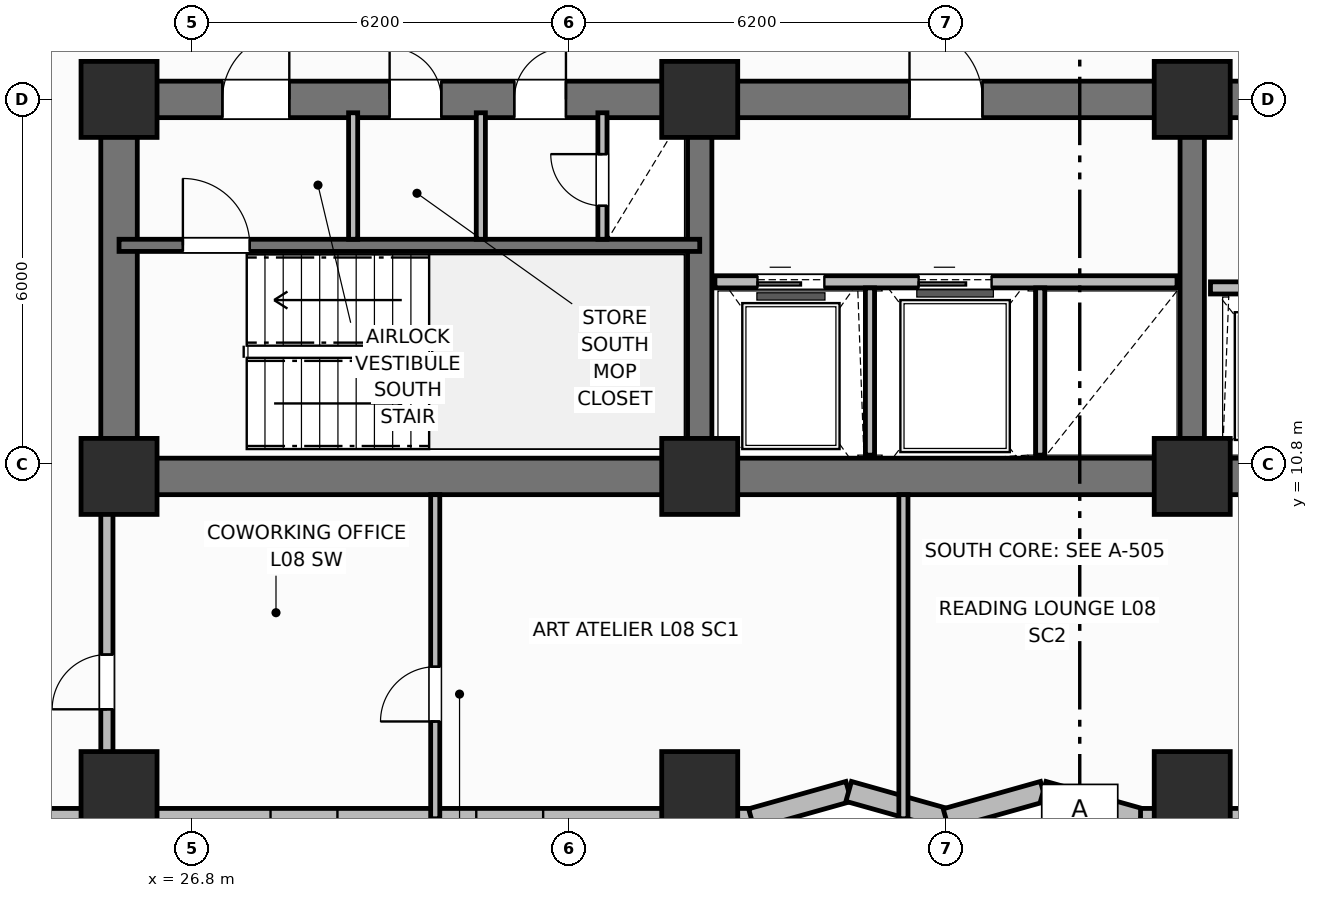
"""IFC4 building model, lengths in metres.
Left out: names, types, materials, properties, quantities, classifications, styles, units other than length and angle.
Written with IfcOpenShell. Run it as: python <this file> out.ifc"""

import sys

from ifc_helpers import new_model, si_unit, direction, frame, frame_2d, origin, origin_2d, place, context, subcontext, project, spatial, rectangle, extrude, element, fill, save


model = new_model("IFC4")
c1 = context("Model", 3, precision=1e-05, world=origin(), true_north=direction((0.0, 1.0)))
c2 = subcontext(c1, "Body", "Model", "MODEL_VIEW")
j1 = project(units=[si_unit("LENGTHUNIT", "METRE"), si_unit("PLANEANGLEUNIT", "RADIAN")], contexts=[c1])
p1 = place(None, origin())
s1 = spatial("IfcSite", under=j1, at=p1, CompositionType="ELEMENT")
p2 = place(p1, origin())
s2 = spatial("IfcBuilding", under=s1, at=p2, CompositionType="ELEMENT")
p3 = place(p2, frame((0.0, 0.0, 36.2)))
s3 = spatial("IfcBuildingStorey", under=s2, at=p3, CompositionType="ELEMENT", Elevation=36.2)
p4 = place(p3, frame((52.8, 10.6, 0.0), z_axis=(0.0, 0.0, 1.0), x_axis=(-1.0, 0.0, 0.0)))
e1 = element("IfcWall", 1, at=p4, inside=s3, PredefinedType="SHEAR", context=c2, shape_type="SweptSolid", body=[
    extrude(rectangle(XDim=27.2, YDim=0.6, at=frame_2d((13.6, 0.0))), origin(), (0.0, 0.0, 1.0), 3.7),
])
p5 = place(p3, frame((25.6, 10.9, 0.0), z_axis=(0.0, 0.0, 1.0), x_axis=(0.0, 1.0, 0.0)))
e2 = element("IfcWall", 2, at=p5, inside=s3, PredefinedType="SHEAR", context=c2, shape_type="SweptSolid", body=[
    extrude(rectangle(XDim=5.6, YDim=0.6, at=frame_2d((2.8, 0.0))), origin(), (0.0, 0.0, 1.0), 3.7),
])
p6 = place(p3, frame((25.6, 16.8, 0.0), z_axis=(0.0, 0.0, 1.0), x_axis=(1.0, 0.0, 0.0)))
e3 = element("IfcWall", 3, at=p6, inside=s3, PredefinedType="SHEAR", context=c2, shape_type="SweptSolid", body=[
    extrude(rectangle(XDim=27.2, YDim=0.6, at=frame_2d((13.6, 0.0))), origin(), (0.0, 0.0, 1.0), 3.7),
])
p7 = place(p6, frame((1.7, 0.0, 0.0)))
e4 = element("IfcOpeningElement", 4, at=p7, cuts=e3, PredefinedType="OPENING", context=c2, shape_type="SweptSolid", body=[
    extrude(rectangle(XDim=1.1, YDim=2.15, at=frame_2d((0.55, 1.075))), frame((0.0, 0.31, 0.0), z_axis=(0.0, -1.0, 0.0), x_axis=(1.0, 0.0, 0.0)), (0.0, 0.0, 1.0), 0.62),
])
p8 = place(p6, frame((4.45, 0.0, 0.0)))
e5 = element("IfcOpeningElement", 5, at=p8, cuts=e3, PredefinedType="OPENING", context=c2, shape_type="SweptSolid", body=[
    extrude(rectangle(XDim=0.85, YDim=2.1, at=frame_2d((0.425, 1.05))), frame((0.0, 0.31, 0.0), z_axis=(0.0, -1.0, 0.0), x_axis=(1.0, 0.0, 0.0)), (0.0, 0.0, 1.0), 0.62),
])
p9 = place(p6, frame((6.5, 0.0, 0.0)))
e6 = element("IfcOpeningElement", 6, at=p9, cuts=e3, PredefinedType="OPENING", context=c2, shape_type="SweptSolid", body=[
    extrude(rectangle(XDim=0.85, YDim=2.1, at=frame_2d((0.425, 1.05))), frame((0.0, 0.31, 0.0), z_axis=(0.0, -1.0, 0.0), x_axis=(1.0, 0.0, 0.0)), (0.0, 0.0, 1.0), 0.62),
])
p10 = place(p6, frame((13.0, 0.0, 0.0)))
e7 = element("IfcOpeningElement", 7, at=p10, cuts=e3, PredefinedType="OPENING", context=c2, shape_type="SweptSolid", body=[
    extrude(rectangle(XDim=1.2, YDim=2.15, at=frame_2d((0.6, 1.075))), frame((0.0, 0.31, 0.0), z_axis=(0.0, -1.0, 0.0), x_axis=(1.0, 0.0, 0.0)), (0.0, 0.0, 1.0), 0.62),
])
p11 = place(p6, frame((20.4, 0.0, 0.0)))
e8 = element("IfcOpeningElement", 8, at=p11, cuts=e3, PredefinedType="OPENING", context=c2, shape_type="SweptSolid", body=[
    extrude(rectangle(XDim=1.3, YDim=2.2, at=frame_2d((0.65, 1.1))), frame((0.0, 0.31, 0.0), z_axis=(0.0, -1.0, 0.0), x_axis=(1.0, 0.0, 0.0)), (0.0, 0.0, 1.0), 0.62),
])
p12 = place(p6, frame((24.65, 0.0, 0.0)))
e9 = element("IfcOpeningElement", 9, at=p12, cuts=e3, PredefinedType="OPENING", context=c2, shape_type="SweptSolid", body=[
    extrude(rectangle(XDim=0.85, YDim=2.1, at=frame_2d((0.425, 1.05))), frame((0.0, 0.31, 0.0), z_axis=(0.0, -1.0, 0.0), x_axis=(1.0, 0.0, 0.0)), (0.0, 0.0, 1.0), 0.62),
])
for number, where, z_axis, x_axis in (
    (10, (35.15, 10.9, 0.0), (0.0, 0.0, 1.0), (0.0, 1.0, 0.0)),
    (11, (43.25, 10.9, 0.0), (0.0, 0.0, 1.0), (0.0, 1.0, 0.0)),
):
    element("IfcWall", number, at=place(p3, frame(where, z_axis=z_axis, x_axis=x_axis)), inside=s3, PredefinedType="SHEAR", context=c2, shape_type="SweptSolid", body=[
        extrude(rectangle(XDim=5.6, YDim=0.4, at=frame_2d((2.8, 0.0))), origin(), (0.0, 0.0, 1.0), 3.7),
    ])
for number, where, z_axis, x_axis in (
    (12, (25.6, 10.6, 0.0), (0.0, 0.0, 1.0), (1.0, 0.0, 0.0)),
    (13, (25.6, 16.8, 0.0), (0.0, 0.0, 1.0), (1.0, 0.0, 0.0)),
    (14, (35.15, 10.6, 0.0), (0.0, 0.0, 1.0), (1.0, 0.0, 0.0)),
    (15, (35.15, 16.8, 0.0), (0.0, 0.0, 1.0), (1.0, 0.0, 0.0)),
    (16, (43.25, 10.6, 0.0), (0.0, 0.0, 1.0), (1.0, 0.0, 0.0)),
    (17, (43.25, 16.8, 0.0), (0.0, 0.0, 1.0), (1.0, 0.0, 0.0)),
    (18, (25.6, 5.45, 0.0), (0.0, 0.0, 1.0), (1.0, 0.0, 0.0)),
    (19, (35.15, 5.45, 0.0), (0.0, 0.0, 1.0), (1.0, 0.0, 0.0)),
    (20, (43.25, 5.45, 0.0), (0.0, 0.0, 1.0), (1.0, 0.0, 0.0)),
):
    element("IfcColumn", number, at=place(p3, frame(where, z_axis=z_axis, x_axis=x_axis)), inside=s3, PredefinedType="COLUMN", context=c2, shape_type="SweptSolid", body=[
        extrude(rectangle(XDim=1.25, YDim=1.25, at=origin_2d()), origin(), (0.0, 0.0, 1.0), 3.7),
    ])
p13 = place(p3, frame((18.6, 4.97, 0.0), z_axis=(0.0, 0.0, 1.0), x_axis=(1.0, 0.0, 0.0)))
e21 = element("IfcWall", 21, at=p13, inside=s3, PredefinedType="SOLIDWALL", context=c2, shape_type="SweptSolid", body=[
    extrude(rectangle(XDim=17.4, YDim=0.34, at=frame_2d((8.7, 0.0))), origin(), (0.0, 0.0, 1.0), 2.7),
])
p14 = place(p13, frame((1.442, 0.0, 0.93)))
e22 = element("IfcOpeningElement", 22, at=p14, cuts=e21, PredefinedType="OPENING", context=c2, shape_type="SweptSolid", body=[
    extrude(rectangle(XDim=1.1, YDim=1.65, at=frame_2d((0.55, 0.825))), frame((0.0, 0.18, 0.0), z_axis=(0.0, -1.0, 0.0), x_axis=(1.0, 0.0, 0.0)), (0.0, 0.0, 1.0), 0.36),
])
p15 = place(p13, frame((3.075, 0.0, 0.93)))
e23 = element("IfcOpeningElement", 23, at=p15, cuts=e21, PredefinedType="OPENING", context=c2, shape_type="SweptSolid", body=[
    extrude(rectangle(XDim=1.1, YDim=1.65, at=frame_2d((0.55, 0.825))), frame((0.0, 0.18, 0.0), z_axis=(0.0, -1.0, 0.0), x_axis=(1.0, 0.0, 0.0)), (0.0, 0.0, 1.0), 0.36),
])
p16 = place(p13, frame((9.492, 0.0, 0.93)))
e24 = element("IfcOpeningElement", 24, at=p16, cuts=e21, PredefinedType="OPENING", context=c2, shape_type="SweptSolid", body=[
    extrude(rectangle(XDim=1.1, YDim=1.65, at=frame_2d((0.55, 0.825))), frame((0.0, 0.18, 0.0), z_axis=(0.0, -1.0, 0.0), x_axis=(1.0, 0.0, 0.0)), (0.0, 0.0, 1.0), 0.36),
])
p17 = place(p13, frame((12.875, 0.0, 0.93)))
e25 = element("IfcOpeningElement", 25, at=p17, cuts=e21, PredefinedType="OPENING", context=c2, shape_type="SweptSolid", body=[
    extrude(rectangle(XDim=1.1, YDim=1.65, at=frame_2d((0.55, 0.825))), frame((0.0, 0.18, 0.0), z_axis=(0.0, -1.0, 0.0), x_axis=(1.0, 0.0, 0.0)), (0.0, 0.0, 1.0), 0.36),
])
p18 = place(p3, frame((36.0, 4.97, 0.0), z_axis=(0.0, 0.0, 1.0), x_axis=(0.962662902433, 0.270703040766, 0.0)))
e26 = element("IfcWall", 26, at=p18, inside=s3, PredefinedType="SOLIDWALL", context=c2, shape_type="SweptSolid", body=[
    extrude(rectangle(XDim=1.662, YDim=0.34, at=frame_2d((0.831, 0.0))), origin(), (0.0, 0.0, 1.0), 2.7),
])
p19 = place(p3, frame((37.6, 5.42, 0.0), z_axis=(0.0, 0.0, 1.0), x_axis=(0.962652136636, -0.270741322725, 0.0)))
e27 = element("IfcWall", 27, at=p19, inside=s3, PredefinedType="SOLIDWALL", context=c2, shape_type="SweptSolid", body=[
    extrude(rectangle(XDim=1.662, YDim=0.34, at=frame_2d((0.831, 0.0))), origin(), (0.0, 0.0, 1.0), 2.7),
])
p20 = place(p3, frame((39.2, 4.97, 0.0), z_axis=(0.0, 0.0, 1.0), x_axis=(0.962662902433, 0.270703040766, 0.0)))
e28 = element("IfcWall", 28, at=p20, inside=s3, PredefinedType="SOLIDWALL", context=c2, shape_type="SweptSolid", body=[
    extrude(rectangle(XDim=1.662, YDim=0.34, at=frame_2d((0.831, 0.0))), origin(), (0.0, 0.0, 1.0), 2.7),
])
p21 = place(p3, frame((40.8, 5.42, 0.0), z_axis=(0.0, 0.0, 1.0), x_axis=(0.962652136636, -0.270741322725, 0.0)))
e29 = element("IfcWall", 29, at=p21, inside=s3, PredefinedType="SOLIDWALL", context=c2, shape_type="SweptSolid", body=[
    extrude(rectangle(XDim=1.662, YDim=0.34, at=frame_2d((0.831, 0.0))), origin(), (0.0, 0.0, 1.0), 2.7),
])
p22 = place(p3, frame((42.4, 4.97, 0.0), z_axis=(0.0, 0.0, 1.0), x_axis=(1.0, 0.0, 0.0)))
e30 = element("IfcWall", 30, at=p22, inside=s3, PredefinedType="SOLIDWALL", context=c2, shape_type="SweptSolid", body=[
    extrude(rectangle(XDim=17.4, YDim=0.34, at=frame_2d((8.7, 0.0))), origin(), (0.0, 0.0, 1.0), 2.7),
])
p23 = place(p22, frame((2.06, 0.0, 0.93)))
e31 = element("IfcOpeningElement", 31, at=p23, cuts=e30, PredefinedType="OPENING", context=c2, shape_type="SweptSolid", body=[
    extrude(rectangle(XDim=1.1, YDim=1.65, at=frame_2d((0.55, 0.825))), frame((0.0, 0.18, 0.0), z_axis=(0.0, -1.0, 0.0), x_axis=(1.0, 0.0, 0.0)), (0.0, 0.0, 1.0), 0.36),
])
p24 = place(p22, frame((5.28, 0.0, 0.93)))
e32 = element("IfcOpeningElement", 32, at=p24, cuts=e30, PredefinedType="OPENING", context=c2, shape_type="SweptSolid", body=[
    extrude(rectangle(XDim=1.1, YDim=1.65, at=frame_2d((0.55, 0.825))), frame((0.0, 0.18, 0.0), z_axis=(0.0, -1.0, 0.0), x_axis=(1.0, 0.0, 0.0)), (0.0, 0.0, 1.0), 0.36),
])
p25 = place(p22, frame((7.8, 0.0, 0.93)))
e33 = element("IfcOpeningElement", 33, at=p25, cuts=e30, PredefinedType="OPENING", context=c2, shape_type="SweptSolid", body=[
    extrude(rectangle(XDim=1.1, YDim=1.65, at=frame_2d((0.55, 0.825))), frame((0.0, 0.18, 0.0), z_axis=(0.0, -1.0, 0.0), x_axis=(1.0, 0.0, 0.0)), (0.0, 0.0, 1.0), 0.36),
])
p26 = place(p22, frame((14.59, 0.0, 0.93)))
e34 = element("IfcOpeningElement", 34, at=p26, cuts=e30, PredefinedType="OPENING", context=c2, shape_type="SweptSolid", body=[
    extrude(rectangle(XDim=1.1, YDim=1.65, at=frame_2d((0.55, 0.825))), frame((0.0, 0.18, 0.0), z_axis=(0.0, -1.0, 0.0), x_axis=(1.0, 0.0, 0.0)), (0.0, 0.0, 1.0), 0.36),
])
p27 = place(p3, frame((25.6, 14.4, 0.0), z_axis=(0.0, 0.0, 1.0), x_axis=(1.0, 0.0, 0.0)))
e35 = element("IfcWall", 35, at=p27, inside=s3, PredefinedType="SHEAR", context=c2, shape_type="SweptSolid", body=[
    extrude(rectangle(XDim=9.55, YDim=0.2, at=frame_2d((4.775, 0.0))), origin(), (0.0, 0.0, 1.0), 3.7),
])
p28 = place(p27, frame((1.05, 0.0, 0.0)))
e36 = element("IfcOpeningElement", 36, at=p28, cuts=e35, PredefinedType="OPENING", context=c2, shape_type="SweptSolid", body=[
    extrude(rectangle(XDim=1.1, YDim=2.15, at=frame_2d((0.55, 1.075))), frame((0.0, 0.11, 0.0), z_axis=(0.0, -1.0, 0.0), x_axis=(1.0, 0.0, 0.0)), (0.0, 0.0, 1.0), 0.22),
])
for number, where, z_axis, x_axis in (
    (37, (29.45, 14.5, 0.0), (0.0, 0.0, 1.0), (0.0, 1.0, 0.0)),
    (38, (31.55, 14.5, 0.0), (0.0, 0.0, 1.0), (0.0, 1.0, 0.0)),
):
    element("IfcWall", number, at=place(p3, frame(where, z_axis=z_axis, x_axis=x_axis)), inside=s3, PredefinedType="PARTITIONING", context=c2, shape_type="SweptSolid", body=[
        extrude(rectangle(XDim=2.08, YDim=0.15, at=frame_2d((1.04, 0.0))), origin(), (0.0, 0.0, 1.0), 2.53),
    ])
p29 = place(p3, frame((33.55, 14.5, 0.0), z_axis=(0.0, 0.0, 1.0), x_axis=(0.0, 1.0, 0.0)))
e39 = element("IfcWall", 39, at=p29, inside=s3, PredefinedType="PARTITIONING", context=c2, shape_type="SweptSolid", body=[
    extrude(rectangle(XDim=2.08, YDim=0.15, at=frame_2d((1.04, 0.0))), origin(), (0.0, 0.0, 1.0), 2.53),
])
p30 = place(p29, frame((0.55, 0.0, 0.0)))
e40 = element("IfcOpeningElement", 40, at=p30, cuts=e39, PredefinedType="OPENING", context=c2, shape_type="SweptSolid", body=[
    extrude(rectangle(XDim=0.85, YDim=2.05, at=frame_2d((0.425, 1.025))), frame((0.0, 0.085, 0.0), z_axis=(0.0, -1.0, 0.0), x_axis=(1.0, 0.0, 0.0)), (0.0, 0.0, 1.0), 0.17),
])
p31 = place(p3, frame((35.4, 13.8, 0.0), z_axis=(0.0, 0.0, 1.0), x_axis=(1.0, 0.0, 0.0)))
e41 = element("IfcWall", 41, at=p31, inside=s3, PredefinedType="PARTITIONING", context=c2, shape_type="SweptSolid", body=[
    extrude(rectangle(XDim=7.6, YDim=0.2, at=frame_2d((3.8, 0.0))), origin(), (0.0, 0.0, 1.0), 2.3),
])
p32 = place(p31, frame((0.7, 0.0, 0.0)))
e42 = element("IfcOpeningElement", 42, at=p32, cuts=e41, PredefinedType="OPENING", context=c2, shape_type="SweptSolid", body=[
    extrude(rectangle(XDim=1.1, YDim=2.15, at=frame_2d((0.55, 1.075))), frame((0.0, 0.11, 0.0), z_axis=(0.0, -1.0, 0.0), x_axis=(1.0, 0.0, 0.0)), (0.0, 0.0, 1.0), 0.22),
])
p33 = place(p31, frame((3.35, 0.0, 0.0)))
e43 = element("IfcOpeningElement", 43, at=p33, cuts=e41, PredefinedType="OPENING", context=c2, shape_type="SweptSolid", body=[
    extrude(rectangle(XDim=1.2, YDim=2.15, at=frame_2d((0.6, 1.075))), frame((0.0, 0.11, 0.0), z_axis=(0.0, -1.0, 0.0), x_axis=(1.0, 0.0, 0.0)), (0.0, 0.0, 1.0), 0.22),
])
for number, where, z_axis, x_axis in (
    (44, (37.95, 10.95, 0.0), (0.0, 0.0, 1.0), (0.0, 1.0, 0.0)),
    (45, (40.75, 10.95, 0.0), (0.0, 0.0, 1.0), (0.0, 1.0, 0.0)),
):
    element("IfcWall", number, at=place(p3, frame(where, z_axis=z_axis, x_axis=x_axis)), inside=s3, PredefinedType="PARTITIONING", context=c2, shape_type="SweptSolid", body=[
        extrude(rectangle(XDim=2.75, YDim=0.15, at=frame_2d((1.375, 0.0))), origin(), (0.0, 0.0, 1.0), 2.53),
    ])
p34 = place(p3, frame((43.55, 13.7, 0.0), z_axis=(0.0, 0.0, 1.0), x_axis=(1.0, 0.0, 0.0)))
e46 = element("IfcWall", 46, at=p34, inside=s3, PredefinedType="PARTITIONING", context=c2, shape_type="SweptSolid", body=[
    extrude(rectangle(XDim=6.4, YDim=0.2, at=frame_2d((3.2, 0.0))), origin(), (0.0, 0.0, 1.0), 2.53),
])
p35 = place(p34, frame((0.7, 0.0, 0.0)))
e47 = element("IfcOpeningElement", 47, at=p35, cuts=e46, PredefinedType="OPENING", context=c2, shape_type="SweptSolid", body=[
    extrude(rectangle(XDim=1.0, YDim=2.15, at=frame_2d((0.5, 1.075))), frame((0.0, 0.11, 0.0), z_axis=(0.0, -1.0, 0.0), x_axis=(1.0, 0.0, 0.0)), (0.0, 0.0, 1.0), 0.22),
])
p36 = place(p34, frame((2.8, 0.0, 0.0)))
e48 = element("IfcOpeningElement", 48, at=p36, cuts=e46, PredefinedType="OPENING", context=c2, shape_type="SweptSolid", body=[
    extrude(rectangle(XDim=1.0, YDim=2.15, at=frame_2d((0.5, 1.075))), frame((0.0, 0.11, 0.0), z_axis=(0.0, -1.0, 0.0), x_axis=(1.0, 0.0, 0.0)), (0.0, 0.0, 1.0), 0.22),
])
p37 = place(p34, frame((4.9, 0.0, 0.0)))
e49 = element("IfcOpeningElement", 49, at=p37, cuts=e46, PredefinedType="OPENING", context=c2, shape_type="SweptSolid", body=[
    extrude(rectangle(XDim=1.0, YDim=2.15, at=frame_2d((0.5, 1.075))), frame((0.0, 0.11, 0.0), z_axis=(0.0, -1.0, 0.0), x_axis=(1.0, 0.0, 0.0)), (0.0, 0.0, 1.0), 0.22),
])
p38 = place(p3, frame((30.8, 4.97, 0.0), z_axis=(0.0, 0.0, 1.0), x_axis=(0.0, 1.0, 0.0)))
e50 = element("IfcWall", 50, at=p38, inside=s3, PredefinedType="PARTITIONING", context=c2, shape_type="SweptSolid", body=[
    extrude(rectangle(XDim=5.33, YDim=0.15, at=frame_2d((2.665, 0.0))), origin(), (0.0, 0.0, 1.0), 2.53),
])
p39 = place(p38, frame((1.6, 0.0, 0.0)))
e51 = element("IfcOpeningElement", 51, at=p39, cuts=e50, PredefinedType="OPENING", context=c2, shape_type="SweptSolid", body=[
    extrude(rectangle(XDim=0.9, YDim=2.1, at=frame_2d((0.45, 1.05))), frame((0.0, 0.085, 0.0), z_axis=(0.0, -1.0, 0.0), x_axis=(1.0, 0.0, 0.0)), (0.0, 0.0, 1.0), 0.17),
])
p40 = place(p3, frame((38.5, 4.97, 0.0), z_axis=(0.0, 0.0, 1.0), x_axis=(0.0, 1.0, 0.0)))
e52 = element("IfcWall", 52, at=p40, inside=s3, PredefinedType="PARTITIONING", context=c2, shape_type="SweptSolid", body=[
    extrude(rectangle(XDim=5.33, YDim=0.15, at=frame_2d((2.665, 0.0))), origin(), (0.0, 0.0, 1.0), 2.53),
])
p41 = place(p3, frame((25.4, 5.92, 0.0), z_axis=(0.0, 0.0, 1.0), x_axis=(0.0, 1.0, 0.0)))
e53 = element("IfcWall", 53, at=p41, inside=s3, PredefinedType="PARTITIONING", context=c2, shape_type="SweptSolid", body=[
    extrude(rectangle(XDim=4.38, YDim=0.2, at=frame_2d((2.19, 0.0))), origin(), (0.0, 0.0, 1.0), 2.53),
])
p42 = place(p41, frame((0.85, 0.0, 0.0)))
e54 = element("IfcOpeningElement", 54, at=p42, cuts=e53, PredefinedType="OPENING", context=c2, shape_type="SweptSolid", body=[
    extrude(rectangle(XDim=0.9, YDim=2.1, at=frame_2d((0.45, 1.05))), frame((0.0, 0.11, 0.0), z_axis=(0.0, -1.0, 0.0), x_axis=(1.0, 0.0, 0.0)), (0.0, 0.0, 1.0), 0.22),
])
p43 = place(p16, origin())
e55 = element("IfcWindow", 55, at=p43, inside=s3, PartitioningType="SINGLE_PANEL", PredefinedType="WINDOW", context=c2, shape_type="SweptSolid", body=[
    extrude(rectangle(XDim=1.1, YDim=1.65, at=frame_2d((0.55, 0.825))), frame((0.0, 0.03, 0.0), z_axis=(0.0, -1.0, 0.0), x_axis=(1.0, 0.0, 0.0)), (0.0, 0.0, 1.0), 0.06),
])
fill(e24, e55)
p44 = place(p17, origin())
e56 = element("IfcWindow", 56, at=p44, inside=s3, PartitioningType="SINGLE_PANEL", PredefinedType="WINDOW", context=c2, shape_type="SweptSolid", body=[
    extrude(rectangle(XDim=1.1, YDim=1.65, at=frame_2d((0.55, 0.825))), frame((0.0, 0.03, 0.0), z_axis=(0.0, -1.0, 0.0), x_axis=(1.0, 0.0, 0.0)), (0.0, 0.0, 1.0), 0.06),
])
fill(e25, e56)
p45 = place(p28, origin())
e57 = element("IfcDoor", 57, at=p45, inside=s3, OperationType="SINGLE_SWING_LEFT", PredefinedType="DOOR", context=c2, shape_type="SweptSolid", body=[
    extrude(rectangle(XDim=1.1, YDim=2.15, at=frame_2d((0.55, 1.075))), frame((0.0, 0.025, 0.0), z_axis=(0.0, -1.0, 0.0), x_axis=(1.0, 0.0, 0.0)), (0.0, 0.0, 1.0), 0.05),
])
fill(e36, e57)
p46 = place(p30, origin())
e58 = element("IfcDoor", 58, at=p46, inside=s3, OperationType="SINGLE_SWING_RIGHT", PredefinedType="TRAPDOOR", context=c2, shape_type="SweptSolid", body=[
    extrude(rectangle(XDim=0.85, YDim=2.05, at=frame_2d((0.425, 1.025))), frame((0.0, 0.025, 0.0), z_axis=(0.0, -1.0, 0.0), x_axis=(1.0, 0.0, 0.0)), (0.0, 0.0, 1.0), 0.05),
])
fill(e40, e58)
p47 = place(p32, origin())
e59 = element("IfcDoor", 59, at=p47, inside=s3, OperationType="SLIDING_TO_LEFT", PredefinedType="DOOR", context=c2, shape_type="SweptSolid", body=[
    extrude(rectangle(XDim=1.1, YDim=2.15, at=frame_2d((0.55, 1.075))), frame((0.0, 0.025, 0.0), z_axis=(0.0, -1.0, 0.0), x_axis=(1.0, 0.0, 0.0)), (0.0, 0.0, 1.0), 0.05),
])
fill(e42, e59)
p48 = place(p33, origin())
e60 = element("IfcDoor", 60, at=p48, inside=s3, OperationType="SLIDING_TO_LEFT", PredefinedType="DOOR", context=c2, shape_type="SweptSolid", body=[
    extrude(rectangle(XDim=1.2, YDim=2.15, at=frame_2d((0.6, 1.075))), frame((0.0, 0.025, 0.0), z_axis=(0.0, -1.0, 0.0), x_axis=(1.0, 0.0, 0.0)), (0.0, 0.0, 1.0), 0.05),
])
fill(e43, e60)
p49 = place(p39, origin())
e61 = element("IfcDoor", 61, at=p49, inside=s3, OperationType="SINGLE_SWING_LEFT", PredefinedType="DOOR", context=c2, shape_type="SweptSolid", body=[
    extrude(rectangle(XDim=0.9, YDim=2.1, at=frame_2d((0.45, 1.05))), frame((0.0, 0.025, 0.0), z_axis=(0.0, -1.0, 0.0), x_axis=(1.0, 0.0, 0.0)), (0.0, 0.0, 1.0), 0.05),
])
fill(e51, e61)
p50 = place(p42, origin())
e62 = element("IfcDoor", 62, at=p50, inside=s3, OperationType="SINGLE_SWING_LEFT", PredefinedType="DOOR", context=c2, shape_type="SweptSolid", body=[
    extrude(rectangle(XDim=0.9, YDim=2.1, at=frame_2d((0.45, 1.05))), frame((0.0, 0.025, 0.0), z_axis=(0.0, -1.0, 0.0), x_axis=(1.0, 0.0, 0.0)), (0.0, 0.0, 1.0), 0.05),
])
fill(e54, e62)
p51 = place(p7, origin())
e63 = element("IfcDoor", 63, at=p51, inside=s3, OperationType="SINGLE_SWING_RIGHT", PredefinedType="DOOR", context=c2, shape_type="SweptSolid", body=[
    extrude(rectangle(XDim=1.1, YDim=2.15, at=frame_2d((0.55, 1.075))), frame((0.0, 0.025, 0.0), z_axis=(0.0, -1.0, 0.0), x_axis=(1.0, 0.0, 0.0)), (0.0, 0.0, 1.0), 0.05),
])
fill(e4, e63)
p52 = place(p8, origin())
e64 = element("IfcDoor", 64, at=p52, inside=s3, OperationType="SINGLE_SWING_LEFT", PredefinedType="DOOR", context=c2, shape_type="SweptSolid", body=[
    extrude(rectangle(XDim=0.85, YDim=2.1, at=frame_2d((0.425, 1.05))), frame((0.0, 0.025, 0.0), z_axis=(0.0, -1.0, 0.0), x_axis=(1.0, 0.0, 0.0)), (0.0, 0.0, 1.0), 0.05),
])
fill(e5, e64)
p53 = place(p9, origin())
e65 = element("IfcDoor", 65, at=p53, inside=s3, OperationType="SINGLE_SWING_RIGHT", PredefinedType="DOOR", context=c2, shape_type="SweptSolid", body=[
    extrude(rectangle(XDim=0.85, YDim=2.1, at=frame_2d((0.425, 1.05))), frame((0.0, 0.025, 0.0), z_axis=(0.0, -1.0, 0.0), x_axis=(1.0, 0.0, 0.0)), (0.0, 0.0, 1.0), 0.05),
])
fill(e6, e65)
p54 = place(p10, origin())
e66 = element("IfcDoor", 66, at=p54, inside=s3, OperationType="SINGLE_SWING_LEFT", PredefinedType="DOOR", context=c2, shape_type="SweptSolid", body=[
    extrude(rectangle(XDim=1.2, YDim=2.15, at=frame_2d((0.6, 1.075))), frame((0.0, 0.025, 0.0), z_axis=(0.0, -1.0, 0.0), x_axis=(1.0, 0.0, 0.0)), (0.0, 0.0, 1.0), 0.05),
])
fill(e7, e66)
save(model, sys.argv[1])
